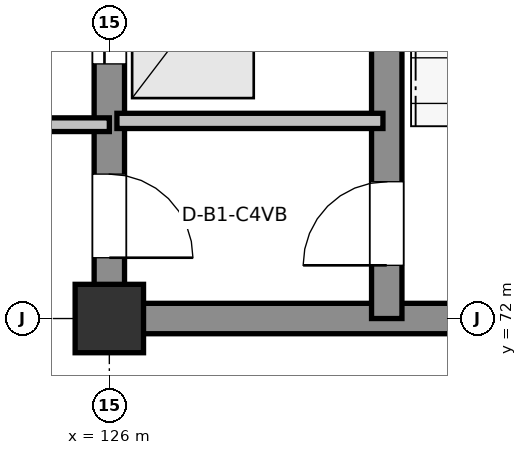
"""IFC4 building model, lengths in metres.
Left out: names, types, materials, properties, quantities, classifications, styles, units other than length and angle.
Written with IfcOpenShell. Run it as: python <this file> out.ifc"""

import sys

from ifc_helpers import new_model, si_unit, direction, frame, frame_2d, origin, origin_2d, place, context, subcontext, project, spatial, rectangle, extrude, element, fill, save


model = new_model("IFC4")
c1 = context("Model", 3, precision=1e-05, world=origin(), true_north=direction((0.0, 1.0)))
c2 = subcontext(c1, "Body", "Model", "MODEL_VIEW")
j1 = project(units=[si_unit("LENGTHUNIT", "METRE"), si_unit("PLANEANGLEUNIT", "RADIAN")], contexts=[c1])
p1 = place(None, origin())
s1 = spatial("IfcSite", under=j1, at=p1, CompositionType="ELEMENT")
p2 = place(p1, origin())
s2 = spatial("IfcBuilding", under=s1, at=p2, CompositionType="ELEMENT")
p3 = place(p2, frame((0.0, 0.0, -4.8)))
s3 = spatial("IfcBuildingStorey", under=s2, at=p3, CompositionType="ELEMENT", Elevation=-4.8)
p4 = place(p3, frame((126.0, 72.0, 0.0), z_axis=(0.0, 0.0, 1.0), x_axis=(1.0, 0.0, 0.0)))
e1 = element("IfcColumn", 1, at=p4, inside=s3, PredefinedType="COLUMN", context=c2, shape_type="SweptSolid", body=[
    extrude(rectangle(XDim=0.9, YDim=0.9, at=origin_2d()), origin(), (0.0, 0.0, 1.0), 4.8),
])
p5 = place(p3, frame((126.0, 72.0, 0.0), z_axis=(0.0, 0.0, 1.0), x_axis=(1.0, 0.0, 0.0)))
e2 = element("IfcWall", 2, at=p5, inside=s3, PredefinedType="SHEAR", context=c2, shape_type="SweptSolid", body=[
    extrude(rectangle(XDim=9.0, YDim=0.4, at=frame_2d((4.5, 0.0))), origin(), (0.0, 0.0, 1.0), 4.55),
])
p6 = place(p3, frame((126.0, 90.0, 0.0), z_axis=(0.0, 0.0, 1.0), x_axis=(0.0, -1.0, 0.0)))
e3 = element("IfcWall", 3, at=p6, inside=s3, PredefinedType="SHEAR", context=c2, shape_type="SweptSolid", body=[
    extrude(rectangle(XDim=18.0, YDim=0.4, at=frame_2d((9.0, 0.0))), origin(), (0.0, 0.0, 1.0), 4.55),
])
p7 = place(p6, frame((16.1, 0.0, 0.0)))
e4 = element("IfcOpeningElement", 4, at=p7, cuts=e3, PredefinedType="OPENING", context=c2, shape_type="SweptSolid", body=[
    extrude(rectangle(XDim=1.1, YDim=2.16, at=frame_2d((0.55, 1.08))), frame((0.0, 0.21, 0.0), z_axis=(0.0, -1.0, 0.0), x_axis=(1.0, 0.0, 0.0)), (0.0, 0.0, 1.0), 0.42),
])
p8 = place(p6, frame((13.45, 0.0, 0.0)))
e5 = element("IfcOpeningElement", 5, at=p8, cuts=e3, PredefinedType="OPENING", context=c2, shape_type="SweptSolid", body=[
    extrude(rectangle(XDim=1.2, YDim=2.2, at=frame_2d((0.6, 1.1))), frame((0.0, 0.21, 0.0), z_axis=(0.0, -1.0, 0.0), x_axis=(1.0, 0.0, 0.0)), (0.0, 0.0, 1.0), 0.42),
])
p9 = place(p6, frame((10.65, 0.0, 0.0)))
e6 = element("IfcOpeningElement", 6, at=p9, cuts=e3, PredefinedType="OPENING", context=c2, shape_type="SweptSolid", body=[
    extrude(rectangle(XDim=1.2, YDim=2.2, at=frame_2d((0.6, 1.1))), frame((0.0, 0.21, 0.0), z_axis=(0.0, -1.0, 0.0), x_axis=(1.0, 0.0, 0.0)), (0.0, 0.0, 1.0), 0.42),
])
p10 = place(p6, frame((5.9, 0.0, 0.0)))
e7 = element("IfcOpeningElement", 7, at=p10, cuts=e3, PredefinedType="OPENING", context=c2, shape_type="SweptSolid", body=[
    extrude(rectangle(XDim=1.8, YDim=2.35, at=frame_2d((0.9, 1.175))), frame((0.0, 0.21, 0.0), z_axis=(0.0, -1.0, 0.0), x_axis=(1.0, 0.0, 0.0)), (0.0, 0.0, 1.0), 0.42),
])
p11 = place(p3, frame((129.65, 72.0, 0.0), z_axis=(0.0, 0.0, 1.0), x_axis=(0.0, 1.0, 0.0)))
e8 = element("IfcWall", 8, at=p11, inside=s3, PredefinedType="SHEAR", context=c2, shape_type="SweptSolid", body=[
    extrude(rectangle(XDim=18.0, YDim=0.4, at=frame_2d((9.0, 0.0))), origin(), (0.0, 0.0, 1.0), 4.55),
])
p12 = place(p11, frame((0.7, 0.0, 0.0)))
e9 = element("IfcOpeningElement", 9, at=p12, cuts=e8, PredefinedType="OPENING", context=c2, shape_type="SweptSolid", body=[
    extrude(rectangle(XDim=1.1, YDim=2.16, at=frame_2d((0.55, 1.08))), frame((0.0, 0.21, 0.0), z_axis=(0.0, -1.0, 0.0), x_axis=(1.0, 0.0, 0.0)), (0.0, 0.0, 1.0), 0.42),
])
p13 = place(p3, frame((126.1, 74.6, 0.0), z_axis=(0.0, 0.0, 1.0), x_axis=(1.0, 0.0, 0.0)))
e10 = element("IfcWall", 10, at=p13, inside=s3, PredefinedType="PARTITIONING", context=c2, shape_type="SweptSolid", body=[
    extrude(rectangle(XDim=3.5, YDim=0.2, at=frame_2d((1.75, 0.0))), origin(), (0.0, 0.0, 1.0), 4.55),
])
p14 = place(p3, frame((122.25, 74.55, 0.0), z_axis=(0.0, 0.0, 1.0), x_axis=(1.0, 0.0, 0.0)))
e11 = element("IfcWall", 11, at=p14, inside=s3, PredefinedType="PARTITIONING", context=c2, shape_type="SweptSolid", body=[
    extrude(rectangle(XDim=3.75, YDim=0.18, at=frame_2d((1.875, 0.0))), origin(), (0.0, 0.0, 1.0), 4.55),
])
p15 = place(p12, origin())
e12 = element("IfcDoor", 12, at=p15, inside=s3, OperationType="SINGLE_SWING_LEFT", PredefinedType="DOOR", context=c2, shape_type="SweptSolid", body=[
    extrude(rectangle(XDim=1.1, YDim=2.16, at=frame_2d((0.55, 1.08))), frame((0.0, 0.025, 0.0), z_axis=(0.0, -1.0, 0.0), x_axis=(1.0, 0.0, 0.0)), (0.0, 0.0, 1.0), 0.05),
])
fill(e9, e12)
p16 = place(p7, origin())
e13 = element("IfcDoor", 13, at=p16, inside=s3, OperationType="SINGLE_SWING_RIGHT", PredefinedType="DOOR", context=c2, shape_type="SweptSolid", body=[
    extrude(rectangle(XDim=1.1, YDim=2.16, at=frame_2d((0.55, 1.08))), frame((0.0, 0.025, 0.0), z_axis=(0.0, -1.0, 0.0), x_axis=(1.0, 0.0, 0.0)), (0.0, 0.0, 1.0), 0.05),
])
fill(e4, e13)
p17 = place(p8, origin())
e14 = element("IfcDoor", 14, at=p17, inside=s3, OperationType="SLIDING_TO_LEFT", PredefinedType="DOOR", context=c2, shape_type="SweptSolid", body=[
    extrude(rectangle(XDim=1.2, YDim=2.2, at=frame_2d((0.6, 1.1))), frame((0.0, 0.025, 0.0), z_axis=(0.0, -1.0, 0.0), x_axis=(1.0, 0.0, 0.0)), (0.0, 0.0, 1.0), 0.05),
])
fill(e5, e14)
save(model, sys.argv[1])
